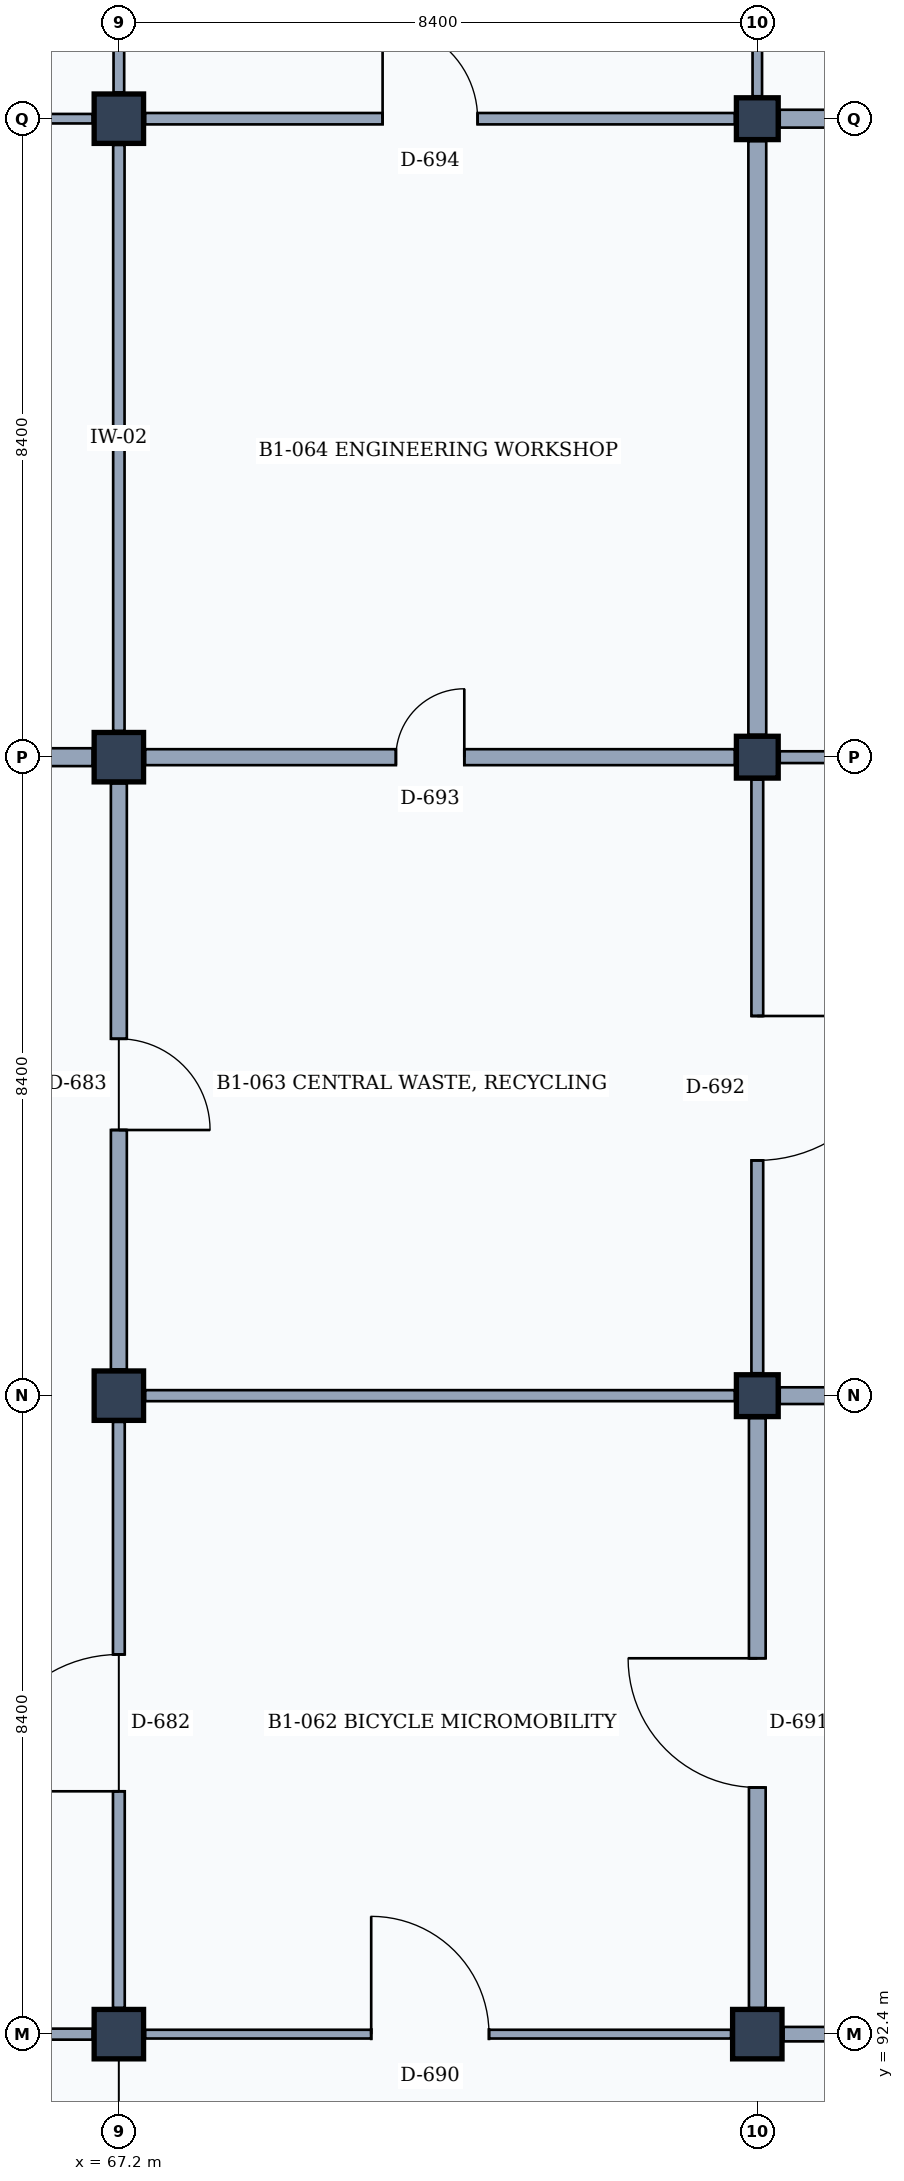
"""IFC4 building model, lengths in metres.
Left out: names, types, materials, properties, quantities, classifications, styles, units other than length and angle.
Written with IfcOpenShell. Run it as: python <this file> out.ifc"""

import sys

from ifc_helpers import new_model, si_unit, direction, frame, frame_2d, origin, origin_2d, place, context, subcontext, project, spatial, rectangle, extrude, element, fill, save


model = new_model("IFC4")
c1 = context("Model", 3, precision=1e-05, world=origin(), true_north=direction((0.0, 1.0)))
c2 = subcontext(c1, "Body", "Model", "MODEL_VIEW")
j1 = project(units=[si_unit("LENGTHUNIT", "METRE"), si_unit("PLANEANGLEUNIT", "RADIAN")], contexts=[c1])
p1 = place(None, origin())
s1 = spatial("IfcSite", under=j1, at=p1, CompositionType="ELEMENT")
p2 = place(p1, origin())
s2 = spatial("IfcBuilding", under=s1, at=p2, CompositionType="ELEMENT")
p3 = place(p2, frame((0.0, 0.0, -4.2)))
s3 = spatial("IfcBuildingStorey", under=s2, at=p3, CompositionType="ELEMENT", Elevation=-4.2)
for number, where, z_axis, x_axis in (
    (1, (67.2, 92.4, 0.0), (0.0, 0.0, 1.0), (1.0, 0.0, 0.0)),
    (2, (67.2, 100.8, 0.0), (0.0, 0.0, 1.0), (1.0, 0.0, 0.0)),
    (3, (67.2, 109.2, 0.0), (0.0, 0.0, 1.0), (1.0, 0.0, 0.0)),
    (4, (67.2, 117.6, 0.0), (0.0, 0.0, 1.0), (1.0, 0.0, 0.0)),
    (5, (75.6, 92.4, 0.0), (0.0, 0.0, 1.0), (1.0, 0.0, 0.0)),
):
    element("IfcColumn", number, at=place(p3, frame(where, z_axis=z_axis, x_axis=x_axis)), inside=s3, PredefinedType="COLUMN", context=c2, shape_type="SweptSolid", body=[
        extrude(rectangle(XDim=0.65, YDim=0.65, at=origin_2d()), origin(), (0.0, 0.0, 1.0), 4.2),
    ])
for number, where, z_axis, x_axis in (
    (6, (75.6, 100.8, 0.0), (0.0, 0.0, 1.0), (1.0, 0.0, 0.0)),
    (7, (75.6, 109.2, 0.0), (0.0, 0.0, 1.0), (1.0, 0.0, 0.0)),
    (8, (75.6, 117.6, 0.0), (0.0, 0.0, 1.0), (1.0, 0.0, 0.0)),
):
    element("IfcColumn", number, at=place(p3, frame(where, z_axis=z_axis, x_axis=x_axis)), inside=s3, PredefinedType="COLUMN", context=c2, shape_type="SweptSolid", body=[
        extrude(rectangle(XDim=0.55, YDim=0.55, at=origin_2d()), origin(), (0.0, 0.0, 1.0), 4.2),
    ])
p4 = place(p3, frame((59.245, 92.4, 0.0), z_axis=(0.0, 0.0, 1.0), x_axis=(1.0, 0.0, 0.0)))
e9 = element("IfcWall", 9, at=p4, inside=s3, PredefinedType="PARTITIONING", context=c2, shape_type="SweptSolid", body=[
    extrude(rectangle(XDim=7.61, YDim=0.145, at=frame_2d((3.805, 0.0))), origin(), (0.0, 0.0, 1.0), 2.93),
])
p5 = place(p4, frame((3.275, 0.0, 0.0)))
e10 = element("IfcOpeningElement", 10, at=p5, cuts=e9, PredefinedType="OPENING", context=c2, shape_type="SweptSolid", body=[
    extrude(rectangle(XDim=0.95, YDim=2.15, at=frame_2d((0.475, 1.075))), frame((0.0, 0.083, 0.0), z_axis=(0.0, -1.0, 0.0), x_axis=(1.0, 0.0, 0.0)), (0.0, 0.0, 1.0), 0.165),
])
p6 = place(p3, frame((67.2, 92.745, 0.0), z_axis=(0.0, 0.0, 1.0), x_axis=(0.0, 1.0, 0.0)))
e11 = element("IfcWall", 11, at=p6, inside=s3, PredefinedType="PARTITIONING", context=c2, shape_type="SweptSolid", body=[
    extrude(rectangle(XDim=7.71, YDim=0.155, at=frame_2d((3.855, 0.0))), origin(), (0.0, 0.0, 1.0), 3.23),
])
p7 = place(p6, frame((2.85, 0.0, 0.0)))
e12 = element("IfcOpeningElement", 12, at=p7, cuts=e11, PredefinedType="OPENING", context=c2, shape_type="SweptSolid", body=[
    extrude(rectangle(XDim=1.8, YDim=2.3, at=frame_2d((0.9, 1.15))), frame((0.0, 0.087, 0.0), z_axis=(0.0, -1.0, 0.0), x_axis=(1.0, 0.0, 0.0)), (0.0, 0.0, 1.0), 0.175),
])
p8 = place(p3, frame((67.2, 101.145, 0.0), z_axis=(0.0, 0.0, 1.0), x_axis=(0.0, 1.0, 0.0)))
e13 = element("IfcWall", 13, at=p8, inside=s3, PredefinedType="PARTITIONING", context=c2, shape_type="SweptSolid", body=[
    extrude(rectangle(XDim=7.71, YDim=0.21, at=frame_2d((3.855, 0.0))), origin(), (0.0, 0.0, 1.0), 3.23),
])
p9 = place(p8, frame((3.15, 0.0, 0.0)))
e14 = element("IfcOpeningElement", 14, at=p9, cuts=e13, PredefinedType="OPENING", context=c2, shape_type="SweptSolid", body=[
    extrude(rectangle(XDim=1.2, YDim=2.2, at=frame_2d((0.6, 1.1))), frame((0.0, 0.115, 0.0), z_axis=(0.0, -1.0, 0.0), x_axis=(1.0, 0.0, 0.0)), (0.0, 0.0, 1.0), 0.23),
])
p10 = place(p3, frame((59.145, 109.2, 0.0), z_axis=(0.0, 0.0, 1.0), x_axis=(1.0, 0.0, 0.0)))
e15 = element("IfcWall", 15, at=p10, inside=s3, PredefinedType="PARTITIONING", context=c2, shape_type="SweptSolid", body=[
    extrude(rectangle(XDim=7.71, YDim=0.235, at=frame_2d((3.855, 0.0))), origin(), (0.0, 0.0, 1.0), 2.93),
])
p11 = place(p10, frame((3.05, 0.0, 0.0)))
e16 = element("IfcOpeningElement", 16, at=p11, cuts=e15, PredefinedType="OPENING", context=c2, shape_type="SweptSolid", body=[
    extrude(rectangle(XDim=1.4, YDim=2.25, at=frame_2d((0.7, 1.125))), frame((0.0, 0.127, 0.0), z_axis=(0.0, -1.0, 0.0), x_axis=(1.0, 0.0, 0.0)), (0.0, 0.0, 1.0), 0.255),
])
p12 = place(p3, frame((67.2, 109.545, 0.0), z_axis=(0.0, 0.0, 1.0), x_axis=(0.0, 1.0, 0.0)))
e17 = element("IfcWall", 17, at=p12, inside=s3, PredefinedType="PARTITIONING", context=c2, shape_type="SweptSolid", body=[
    extrude(rectangle(XDim=7.71, YDim=0.15, at=frame_2d((3.855, 0.0))), origin(), (0.0, 0.0, 1.0), 3.23),
])
p13 = place(p3, frame((59.145, 117.6, 0.0), z_axis=(0.0, 0.0, 1.0), x_axis=(1.0, 0.0, 0.0)))
e18 = element("IfcWall", 18, at=p13, inside=s3, PredefinedType="PARTITIONING", context=c2, shape_type="SweptSolid", body=[
    extrude(rectangle(XDim=7.71, YDim=0.125, at=frame_2d((3.855, 0.0))), origin(), (0.0, 0.0, 1.0), 2.93),
])
p14 = place(p13, frame((3.0, 0.0, 0.0)))
e19 = element("IfcOpeningElement", 19, at=p14, cuts=e18, PredefinedType="OPENING", context=c2, shape_type="SweptSolid", body=[
    extrude(rectangle(XDim=1.5, YDim=2.3, at=frame_2d((0.75, 1.15))), frame((0.0, 0.073, 0.0), z_axis=(0.0, -1.0, 0.0), x_axis=(1.0, 0.0, 0.0)), (0.0, 0.0, 1.0), 0.145),
])
p15 = place(p3, frame((67.2, 117.945, 0.0), z_axis=(0.0, 0.0, 1.0), x_axis=(0.0, 1.0, 0.0)))
e20 = element("IfcWall", 20, at=p15, inside=s3, PredefinedType="PARTITIONING", context=c2, shape_type="SweptSolid", body=[
    extrude(rectangle(XDim=7.71, YDim=0.14, at=frame_2d((3.855, 0.0))), origin(), (0.0, 0.0, 1.0), 3.23),
])
p16 = place(p3, frame((67.545, 92.4, 0.0), z_axis=(0.0, 0.0, 1.0), x_axis=(1.0, 0.0, 0.0)))
e21 = element("IfcWall", 21, at=p16, inside=s3, PredefinedType="PARTITIONING", context=c2, shape_type="SweptSolid", body=[
    extrude(rectangle(XDim=7.71, YDim=0.115, at=frame_2d((3.855, 0.0))), origin(), (0.0, 0.0, 1.0), 2.93),
])
p17 = place(p16, frame((2.975, 0.0, 0.0)))
e22 = element("IfcOpeningElement", 22, at=p17, cuts=e21, PredefinedType="OPENING", context=c2, shape_type="SweptSolid", body=[
    extrude(rectangle(XDim=1.55, YDim=2.35, at=frame_2d((0.775, 1.175))), frame((0.0, 0.067, 0.0), z_axis=(0.0, -1.0, 0.0), x_axis=(1.0, 0.0, 0.0)), (0.0, 0.0, 1.0), 0.135),
])
p18 = place(p3, frame((75.6, 92.745, 0.0), z_axis=(0.0, 0.0, 1.0), x_axis=(0.0, 1.0, 0.0)))
e23 = element("IfcWall", 23, at=p18, inside=s3, PredefinedType="PARTITIONING", context=c2, shape_type="SweptSolid", body=[
    extrude(rectangle(XDim=7.76, YDim=0.22, at=frame_2d((3.88, 0.0))), origin(), (0.0, 0.0, 1.0), 3.23),
])
p19 = place(p18, frame((2.9, 0.0, 0.0)))
e24 = element("IfcOpeningElement", 24, at=p19, cuts=e23, PredefinedType="OPENING", context=c2, shape_type="SweptSolid", body=[
    extrude(rectangle(XDim=1.7, YDim=2.3, at=frame_2d((0.85, 1.15))), frame((0.0, 0.12, 0.0), z_axis=(0.0, -1.0, 0.0), x_axis=(1.0, 0.0, 0.0)), (0.0, 0.0, 1.0), 0.24),
])
p20 = place(p3, frame((67.545, 100.8, 0.0), z_axis=(0.0, 0.0, 1.0), x_axis=(1.0, 0.0, 0.0)))
e25 = element("IfcWall", 25, at=p20, inside=s3, PredefinedType="PARTITIONING", context=c2, shape_type="SweptSolid", body=[
    extrude(rectangle(XDim=7.76, YDim=0.145, at=frame_2d((3.88, 0.0))), origin(), (0.0, 0.0, 1.0), 2.93),
])
p21 = place(p3, frame((75.6, 101.095, 0.0), z_axis=(0.0, 0.0, 1.0), x_axis=(0.0, 1.0, 0.0)))
e26 = element("IfcWall", 26, at=p21, inside=s3, PredefinedType="PARTITIONING", context=c2, shape_type="SweptSolid", body=[
    extrude(rectangle(XDim=7.81, YDim=0.155, at=frame_2d((3.905, 0.0))), origin(), (0.0, 0.0, 1.0), 3.23),
])
p22 = place(p21, frame((2.8, 0.0, 0.0)))
e27 = element("IfcOpeningElement", 27, at=p22, cuts=e26, PredefinedType="OPENING", context=c2, shape_type="SweptSolid", body=[
    extrude(rectangle(XDim=1.9, YDim=2.4, at=frame_2d((0.95, 1.2))), frame((0.0, 0.087, 0.0), z_axis=(0.0, -1.0, 0.0), x_axis=(1.0, 0.0, 0.0)), (0.0, 0.0, 1.0), 0.175),
])
p23 = place(p3, frame((67.545, 109.2, 0.0), z_axis=(0.0, 0.0, 1.0), x_axis=(1.0, 0.0, 0.0)))
e28 = element("IfcWall", 28, at=p23, inside=s3, PredefinedType="PARTITIONING", context=c2, shape_type="SweptSolid", body=[
    extrude(rectangle(XDim=7.76, YDim=0.21, at=frame_2d((3.88, 0.0))), origin(), (0.0, 0.0, 1.0), 2.93),
])
p24 = place(p23, frame((3.3, 0.0, 0.0)))
e29 = element("IfcOpeningElement", 29, at=p24, cuts=e28, PredefinedType="OPENING", context=c2, shape_type="SweptSolid", body=[
    extrude(rectangle(XDim=0.9, YDim=2.1, at=frame_2d((0.45, 1.05))), frame((0.0, 0.115, 0.0), z_axis=(0.0, -1.0, 0.0), x_axis=(1.0, 0.0, 0.0)), (0.0, 0.0, 1.0), 0.23),
])
p25 = place(p3, frame((75.6, 109.495, 0.0), z_axis=(0.0, 0.0, 1.0), x_axis=(0.0, 1.0, 0.0)))
e30 = element("IfcWall", 30, at=p25, inside=s3, PredefinedType="PARTITIONING", context=c2, shape_type="SweptSolid", body=[
    extrude(rectangle(XDim=7.81, YDim=0.235, at=frame_2d((3.905, 0.0))), origin(), (0.0, 0.0, 1.0), 3.23),
])
p26 = place(p3, frame((67.545, 117.6, 0.0), z_axis=(0.0, 0.0, 1.0), x_axis=(1.0, 0.0, 0.0)))
e31 = element("IfcWall", 31, at=p26, inside=s3, PredefinedType="PARTITIONING", context=c2, shape_type="SweptSolid", body=[
    extrude(rectangle(XDim=7.76, YDim=0.15, at=frame_2d((3.88, 0.0))), origin(), (0.0, 0.0, 1.0), 2.93),
])
p27 = place(p26, frame((3.125, 0.0, 0.0)))
e32 = element("IfcOpeningElement", 32, at=p27, cuts=e31, PredefinedType="OPENING", context=c2, shape_type="SweptSolid", body=[
    extrude(rectangle(XDim=1.25, YDim=2.3, at=frame_2d((0.625, 1.15))), frame((0.0, 0.085, 0.0), z_axis=(0.0, -1.0, 0.0), x_axis=(1.0, 0.0, 0.0)), (0.0, 0.0, 1.0), 0.17),
])
p28 = place(p3, frame((75.6, 117.895, 0.0), z_axis=(0.0, 0.0, 1.0), x_axis=(0.0, 1.0, 0.0)))
e33 = element("IfcWall", 33, at=p28, inside=s3, PredefinedType="PARTITIONING", context=c2, shape_type="SweptSolid", body=[
    extrude(rectangle(XDim=7.81, YDim=0.125, at=frame_2d((3.905, 0.0))), origin(), (0.0, 0.0, 1.0), 3.23),
])
p29 = place(p3, frame((75.945, 92.4, 0.0), z_axis=(0.0, 0.0, 1.0), x_axis=(1.0, 0.0, 0.0)))
e34 = element("IfcWall", 34, at=p29, inside=s3, PredefinedType="PARTITIONING", context=c2, shape_type="SweptSolid", body=[
    extrude(rectangle(XDim=7.71, YDim=0.19, at=frame_2d((3.855, 0.0))), origin(), (0.0, 0.0, 1.0), 2.93),
])
p30 = place(p29, frame((2.85, 0.0, 0.0)))
e35 = element("IfcOpeningElement", 35, at=p30, cuts=e34, PredefinedType="OPENING", context=c2, shape_type="SweptSolid", body=[
    extrude(rectangle(XDim=1.8, YDim=2.3, at=frame_2d((0.9, 1.15))), frame((0.0, 0.105, 0.0), z_axis=(0.0, -1.0, 0.0), x_axis=(1.0, 0.0, 0.0)), (0.0, 0.0, 1.0), 0.21),
])
p31 = place(p3, frame((75.895, 100.8, 0.0), z_axis=(0.0, 0.0, 1.0), x_axis=(1.0, 0.0, 0.0)))
e36 = element("IfcWall", 36, at=p31, inside=s3, PredefinedType="PARTITIONING", context=c2, shape_type="SweptSolid", body=[
    extrude(rectangle(XDim=7.81, YDim=0.22, at=frame_2d((3.905, 0.0))), origin(), (0.0, 0.0, 1.0), 2.93),
])
p32 = place(p3, frame((75.895, 109.2, 0.0), z_axis=(0.0, 0.0, 1.0), x_axis=(1.0, 0.0, 0.0)))
e37 = element("IfcWall", 37, at=p32, inside=s3, PredefinedType="PARTITIONING", context=c2, shape_type="SweptSolid", body=[
    extrude(rectangle(XDim=7.81, YDim=0.155, at=frame_2d((3.905, 0.0))), origin(), (0.0, 0.0, 1.0), 2.93),
])
p33 = place(p32, frame((3.0, 0.0, 0.0)))
e38 = element("IfcOpeningElement", 38, at=p33, cuts=e37, PredefinedType="OPENING", context=c2, shape_type="SweptSolid", body=[
    extrude(rectangle(XDim=1.5, YDim=2.3, at=frame_2d((0.75, 1.15))), frame((0.0, 0.087, 0.0), z_axis=(0.0, -1.0, 0.0), x_axis=(1.0, 0.0, 0.0)), (0.0, 0.0, 1.0), 0.175),
])
p34 = place(p3, frame((75.895, 117.6, 0.0), z_axis=(0.0, 0.0, 1.0), x_axis=(1.0, 0.0, 0.0)))
e39 = element("IfcWall", 39, at=p34, inside=s3, PredefinedType="PARTITIONING", context=c2, shape_type="SweptSolid", body=[
    extrude(rectangle(XDim=7.81, YDim=0.235, at=frame_2d((3.905, 0.0))), origin(), (0.0, 0.0, 1.0), 2.93),
])
p35 = place(p34, frame((2.925, 0.0, 0.0)))
e40 = element("IfcOpeningElement", 40, at=p35, cuts=e39, PredefinedType="OPENING", context=c2, shape_type="SweptSolid", body=[
    extrude(rectangle(XDim=1.65, YDim=2.25, at=frame_2d((0.825, 1.125))), frame((0.0, 0.127, 0.0), z_axis=(0.0, -1.0, 0.0), x_axis=(1.0, 0.0, 0.0)), (0.0, 0.0, 1.0), 0.255),
])
p36 = place(p7, origin())
e41 = element("IfcDoor", 41, at=p36, inside=s3, OperationType="SINGLE_SWING_LEFT", PredefinedType="DOOR", context=c2, shape_type="SweptSolid", body=[
    extrude(rectangle(XDim=1.8, YDim=2.3, at=frame_2d((0.9, 1.15))), frame((0.0, 0.025, 0.0), z_axis=(0.0, -1.0, 0.0), x_axis=(1.0, 0.0, 0.0)), (0.0, 0.0, 1.0), 0.05),
])
fill(e12, e41)
p37 = place(p9, frame((1.2, 0.0, 0.0), z_axis=(0.0, 0.0, 1.0), x_axis=(-1.0, 0.0, 0.0)))
e42 = element("IfcDoor", 42, at=p37, inside=s3, OperationType="SINGLE_SWING_RIGHT", PredefinedType="DOOR", context=c2, shape_type="SweptSolid", body=[
    extrude(rectangle(XDim=1.2, YDim=2.2, at=frame_2d((0.6, 1.1))), frame((0.0, 0.025, 0.0), z_axis=(0.0, -1.0, 0.0), x_axis=(1.0, 0.0, 0.0)), (0.0, 0.0, 1.0), 0.05),
])
fill(e14, e42)
p38 = place(p17, origin())
e43 = element("IfcDoor", 43, at=p38, inside=s3, OperationType="SINGLE_SWING_LEFT", PredefinedType="DOOR", context=c2, shape_type="SweptSolid", body=[
    extrude(rectangle(XDim=1.55, YDim=2.35, at=frame_2d((0.775, 1.175))), frame((0.0, 0.025, 0.0), z_axis=(0.0, -1.0, 0.0), x_axis=(1.0, 0.0, 0.0)), (0.0, 0.0, 1.0), 0.05),
])
fill(e22, e43)
p39 = place(p19, origin())
e44 = element("IfcDoor", 44, at=p39, inside=s3, OperationType="SINGLE_SWING_RIGHT", PredefinedType="DOOR", context=c2, shape_type="SweptSolid", body=[
    extrude(rectangle(XDim=1.7, YDim=2.3, at=frame_2d((0.85, 1.15))), frame((0.0, 0.025, 0.0), z_axis=(0.0, -1.0, 0.0), x_axis=(1.0, 0.0, 0.0)), (0.0, 0.0, 1.0), 0.05),
])
fill(e24, e44)
p40 = place(p22, frame((1.9, 0.0, 0.0), z_axis=(0.0, 0.0, 1.0), x_axis=(-1.0, 0.0, 0.0)))
e45 = element("IfcDoor", 45, at=p40, inside=s3, OperationType="SINGLE_SWING_LEFT", PredefinedType="DOOR", context=c2, shape_type="SweptSolid", body=[
    extrude(rectangle(XDim=1.9, YDim=2.4, at=frame_2d((0.95, 1.2))), frame((0.0, 0.025, 0.0), z_axis=(0.0, -1.0, 0.0), x_axis=(1.0, 0.0, 0.0)), (0.0, 0.0, 1.0), 0.05),
])
fill(e27, e45)
p41 = place(p24, origin())
e46 = element("IfcDoor", 46, at=p41, inside=s3, OperationType="SINGLE_SWING_RIGHT", PredefinedType="DOOR", context=c2, shape_type="SweptSolid", body=[
    extrude(rectangle(XDim=0.9, YDim=2.1, at=frame_2d((0.45, 1.05))), frame((0.0, 0.025, 0.0), z_axis=(0.0, -1.0, 0.0), x_axis=(1.0, 0.0, 0.0)), (0.0, 0.0, 1.0), 0.05),
])
fill(e29, e46)
p42 = place(p27, origin())
e47 = element("IfcDoor", 47, at=p42, inside=s3, OperationType="SINGLE_SWING_LEFT", PredefinedType="DOOR", context=c2, shape_type="SweptSolid", body=[
    extrude(rectangle(XDim=1.25, YDim=2.3, at=frame_2d((0.625, 1.15))), frame((0.0, 0.025, 0.0), z_axis=(0.0, -1.0, 0.0), x_axis=(1.0, 0.0, 0.0)), (0.0, 0.0, 1.0), 0.05),
])
fill(e32, e47)
save(model, sys.argv[1])
